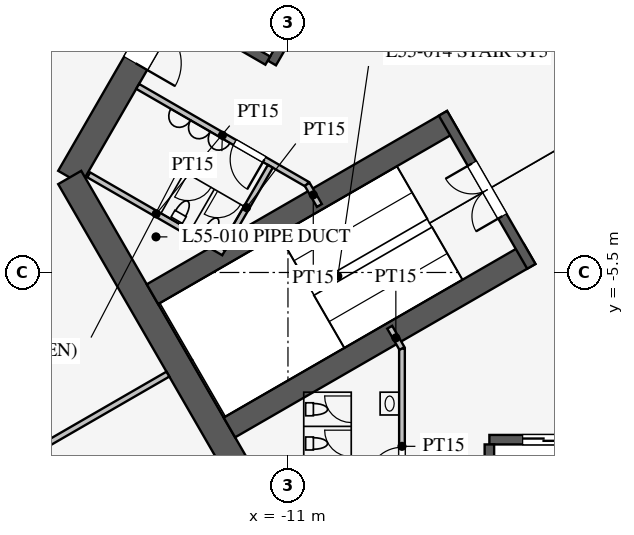
"""IFC4 building model, lengths in metres.
Left out: names, types, materials, properties, quantities, classifications, styles, units other than length and angle.
Written with IfcOpenShell. Run it as: python <this file> out.ifc"""

import sys

from ifc_helpers import new_model, si_unit, direction, frame, frame_2d, origin, place, context, subcontext, project, spatial, rectangle, extrude, element, fill, save


model = new_model("IFC4")
c1 = context("Model", 3, precision=1e-05, world=origin(), true_north=direction((0.0, 1.0)))
c2 = subcontext(c1, "Body", "Model", "MODEL_VIEW")
j1 = project(units=[si_unit("LENGTHUNIT", "METRE"), si_unit("PLANEANGLEUNIT", "RADIAN")], contexts=[c1])
p1 = place(None, origin())
s1 = spatial("IfcSite", under=j1, at=p1, CompositionType="ELEMENT")
p2 = place(p1, origin())
s2 = spatial("IfcBuilding", under=s1, at=p2, CompositionType="ELEMENT")
p3 = place(p2, frame((0.0, 0.0, 240.1)))
s3 = spatial("IfcBuildingStorey", under=s2, at=p3, CompositionType="ELEMENT", Elevation=240.1)
p4 = place(p3, frame((-5.773, 16.0, 0.0), z_axis=(0.0, 0.0, 1.0), x_axis=(-0.500002442456, -0.866023993627, 0.0)))
e1 = element("IfcWall", 1, at=p4, inside=s3, PredefinedType="SHEAR", context=c2, shape_type="SweptSolid", body=[
    extrude(rectangle(XDim=21.939, YDim=0.7, at=frame_2d((10.97, 0.0))), origin(), (0.0, 0.0, 1.0), 4.2),
])
p5 = place(p4, frame((17.27, 0.0, 0.0)))
e2 = element("IfcOpeningElement", 2, at=p5, cuts=e1, PredefinedType="OPENING", context=c2, shape_type="SweptSolid", body=[
    extrude(rectangle(XDim=1.2, YDim=2.1, at=frame_2d((0.6, 1.05))), frame((0.0, 0.36, 0.0), z_axis=(0.0, -1.0, 0.0), x_axis=(1.0, 0.0, 0.0)), (0.0, 0.0, 1.0), 0.72),
])
p6 = place(p4, frame((3.47, 0.0, 0.0)))
e3 = element("IfcOpeningElement", 3, at=p6, cuts=e1, PredefinedType="OPENING", context=c2, shape_type="SweptSolid", body=[
    extrude(rectangle(XDim=1.2, YDim=2.1, at=frame_2d((0.6, 1.05))), frame((0.0, 0.36, 0.0), z_axis=(0.0, -1.0, 0.0), x_axis=(1.0, 0.0, 0.0)), (0.0, 0.0, 1.0), 0.72),
])
p7 = place(p3, frame((-16.743, -3.0, 0.0), z_axis=(0.0, 0.0, 1.0), x_axis=(0.499995765644, -0.866027848477, 0.0)))
e4 = element("IfcWall", 4, at=p7, inside=s3, PredefinedType="SHEAR", context=c2, shape_type="SweptSolid", body=[
    extrude(rectangle(XDim=11.547, YDim=0.7, at=frame_2d((5.773, 0.0))), origin(), (0.0, 0.0, 1.0), 4.2),
])
p8 = place(p3, frame((-5.7, -9.9, 0.0), z_axis=(0.0, 0.0, 1.0), x_axis=(1.0, 0.0, 0.0)))
e5 = element("IfcWall", 5, at=p8, inside=s3, PredefinedType="SHEAR", context=c2, shape_type="SweptSolid", body=[
    extrude(rectangle(XDim=11.4, YDim=0.25, at=frame_2d((5.7, 0.0))), origin(), (0.0, 0.0, 1.0), 4.2),
])
p9 = place(p8, frame((0.875, 0.0, 0.0)))
e6 = element("IfcOpeningElement", 6, at=p9, cuts=e5, PredefinedType="OPENING", context=c2, shape_type="SweptSolid", body=[
    extrude(rectangle(XDim=1.1, YDim=2.2, at=frame_2d((0.55, 1.1))), frame((0.0, 0.135, 0.0), z_axis=(0.0, -1.0, 0.0), x_axis=(1.0, 0.0, 0.0)), (0.0, 0.0, 1.0), 0.27),
])
p10 = place(p8, frame((3.725, 0.0, 0.0)))
e7 = element("IfcOpeningElement", 7, at=p10, cuts=e5, PredefinedType="OPENING", context=c2, shape_type="SweptSolid", body=[
    extrude(rectangle(XDim=1.1, YDim=2.2, at=frame_2d((0.55, 1.1))), frame((0.0, 0.135, 0.0), z_axis=(0.0, -1.0, 0.0), x_axis=(1.0, 0.0, 0.0)), (0.0, 0.0, 1.0), 0.27),
])
p11 = place(p8, frame((6.575, 0.0, 0.0)))
e8 = element("IfcOpeningElement", 8, at=p11, cuts=e5, PredefinedType="OPENING", context=c2, shape_type="SweptSolid", body=[
    extrude(rectangle(XDim=1.1, YDim=2.2, at=frame_2d((0.55, 1.1))), frame((0.0, 0.135, 0.0), z_axis=(0.0, -1.0, 0.0), x_axis=(1.0, 0.0, 0.0)), (0.0, 0.0, 1.0), 0.27),
])
p12 = place(p8, frame((9.425, 0.0, 0.0)))
e9 = element("IfcOpeningElement", 9, at=p12, cuts=e5, PredefinedType="OPENING", context=c2, shape_type="SweptSolid", body=[
    extrude(rectangle(XDim=1.1, YDim=2.2, at=frame_2d((0.55, 1.1))), frame((0.0, 0.135, 0.0), z_axis=(0.0, -1.0, 0.0), x_axis=(1.0, 0.0, 0.0)), (0.0, 0.0, 1.0), 0.27),
])
p13 = place(p3, frame((-5.7, -10.025, 0.0), z_axis=(0.0, 0.0, 1.0), x_axis=(0.0, -1.0, 0.0)))
e10 = element("IfcWall", 10, at=p13, inside=s3, PredefinedType="SHEAR", context=c2, shape_type="SweptSolid", body=[
    extrude(rectangle(XDim=2.625, YDim=0.25, at=frame_2d((1.312, 0.0))), origin(), (0.0, 0.0, 1.0), 4.2),
])
p14 = place(p3, frame((-5.724, 9.886, 0.0), z_axis=(0.0, 0.0, 1.0), x_axis=(-0.500001763848, -0.866024385424, 0.0)))
e11 = element("IfcWall", 11, at=p14, inside=s3, PredefinedType="SHEAR", context=c2, shape_type="SweptSolid", body=[
    extrude(rectangle(XDim=11.4, YDim=0.25, at=frame_2d((5.7, 0.0))), origin(), (0.0, 0.0, 1.0), 4.2),
])
p15 = place(p14, frame((6.525, 0.0, 0.0)))
e12 = element("IfcOpeningElement", 12, at=p15, cuts=e11, PredefinedType="OPENING", context=c2, shape_type="SweptSolid", body=[
    extrude(rectangle(XDim=1.2, YDim=2.2, at=frame_2d((0.6, 1.1))), frame((0.0, 0.135, 0.0), z_axis=(0.0, -1.0, 0.0), x_axis=(1.0, 0.0, 0.0)), (0.0, 0.0, 1.0), 0.27),
])
p16 = place(p14, frame((9.375, 0.0, 0.0)))
e13 = element("IfcOpeningElement", 13, at=p16, cuts=e11, PredefinedType="OPENING", context=c2, shape_type="SweptSolid", body=[
    extrude(rectangle(XDim=1.2, YDim=2.2, at=frame_2d((0.6, 1.1))), frame((0.0, 0.135, 0.0), z_axis=(0.0, -1.0, 0.0), x_axis=(1.0, 0.0, 0.0)), (0.0, 0.0, 1.0), 0.27),
])
p17 = place(p3, frame((-11.532, 0.076, 0.0), z_axis=(0.0, 0.0, 1.0), x_axis=(-0.866013657776, 0.500020344131, 0.0)))
e14 = element("IfcWall", 14, at=p17, inside=s3, PredefinedType="SHEAR", context=c2, shape_type="SweptSolid", body=[
    extrude(rectangle(XDim=2.625, YDim=0.25, at=frame_2d((1.312, 0.0))), origin(), (0.0, 0.0, 1.0), 4.2),
])
for number, where, z_axis, x_axis in (
    (15, (-6.663, -1.509, 0.0), (0.0, 0.0, 1.0), (-0.866, -0.5, 0.0)),
    (16, (-4.638, -5.016, 0.0), (0.0, 0.0, 1.0), (-0.866, -0.5, 0.0)),
):
    element("IfcWall", number, at=place(p3, frame(where, z_axis=z_axis, x_axis=x_axis)), inside=s3, PredefinedType="SHEAR", context=c2, shape_type="SweptSolid", body=[
        extrude(rectangle(XDim=9.125, YDim=0.6, at=frame_2d((4.562, 0.0))), origin(), (0.0, 0.0, 1.0), 4.2),
    ])
p18 = place(p3, frame((-6.922, -1.312, 0.0), z_axis=(0.0, 0.0, 1.0), x_axis=(0.499984536904, -0.866034331223, 0.0)))
e17 = element("IfcWall", 17, at=p18, inside=s3, PredefinedType="SHEAR", context=c2, shape_type="SweptSolid", body=[
    extrude(rectangle(XDim=4.65, YDim=0.25, at=frame_2d((2.325, 0.0))), origin(), (0.0, 0.0, 1.0), 4.2),
])
p19 = place(p18, frame((1.525, 0.0, 0.0)))
e18 = element("IfcOpeningElement", 18, at=p19, cuts=e17, PredefinedType="OPENING", context=c2, shape_type="SweptSolid", body=[
    extrude(rectangle(XDim=1.6, YDim=2.1, at=frame_2d((0.8, 1.05))), frame((0.0, 0.135, 0.0), z_axis=(0.0, -1.0, 0.0), x_axis=(1.0, 0.0, 0.0)), (0.0, 0.0, 1.0), 0.27),
])
p20 = place(p3, frame((-8.0, -7.5, 0.0), z_axis=(0.0, 0.0, 1.0), x_axis=(0.0, -1.0, 0.0)))
e19 = element("IfcWall", 19, at=p20, inside=s3, PredefinedType="PARTITIONING", context=c2, shape_type="SweptSolid", body=[
    extrude(rectangle(XDim=5.15, YDim=0.15, at=frame_2d((2.575, 0.0))), origin(), (0.0, 0.0, 1.0), 4.0),
])
p21 = place(p20, frame((2.6, 0.0, 0.0)))
e20 = element("IfcOpeningElement", 20, at=p21, cuts=e19, PredefinedType="OPENING", context=c2, shape_type="SweptSolid", body=[
    extrude(rectangle(XDim=0.9, YDim=2.1, at=frame_2d((0.45, 1.05))), frame((0.0, 0.085, 0.0), z_axis=(0.0, -1.0, 0.0), x_axis=(1.0, 0.0, 0.0)), (0.0, 0.0, 1.0), 0.17),
])
p22 = place(p3, frame((-10.495, -3.178, 0.0), z_axis=(0.0, 0.0, 1.0), x_axis=(-0.866037967349, 0.499978238636, 0.0)))
e21 = element("IfcWall", 21, at=p22, inside=s3, PredefinedType="PARTITIONING", context=c2, shape_type="SweptSolid", body=[
    extrude(rectangle(XDim=5.15, YDim=0.15, at=frame_2d((2.575, 0.0))), origin(), (0.0, 0.0, 1.0), 4.0),
])
p23 = place(p22, frame((1.3, 0.0, 0.0)))
e22 = element("IfcOpeningElement", 22, at=p23, cuts=e21, PredefinedType="OPENING", context=c2, shape_type="SweptSolid", body=[
    extrude(rectangle(XDim=0.9, YDim=2.1, at=frame_2d((0.45, 1.05))), frame((0.0, 0.085, 0.0), z_axis=(0.0, -1.0, 0.0), x_axis=(1.0, 0.0, 0.0)), (0.0, 0.0, 1.0), 0.17),
])
for number, where, z_axis, x_axis in (
    (23, (-10.495, -3.178, 0.0), (0.0, 0.0, 1.0), (0.5, -0.866, 0.0)),
    (24, (-8.0, -7.5, 0.0), (0.0, 0.0, 1.0), (-0.5, 0.866, 0.0)),
):
    element("IfcWall", number, at=place(p3, frame(where, z_axis=z_axis, x_axis=x_axis)), inside=s3, PredefinedType="PARTITIONING", context=c2, shape_type="SweptSolid", body=[
        extrude(rectangle(XDim=0.645, YDim=0.15, at=frame_2d((0.323, 0.0))), origin(), (0.0, 0.0, 1.0), 4.0),
    ])
p24 = place(p3, frame((-12.691, -4.982, 0.0), z_axis=(0.0, 0.0, 1.0), x_axis=(-0.8660249478, 0.500000789788, 0.0)))
e25 = element("IfcWall", 25, at=p24, inside=s3, PredefinedType="PARTITIONING", context=c2, shape_type="SweptSolid", body=[
    extrude(rectangle(XDim=4.1, YDim=0.15, at=frame_2d((2.05, 0.0))), origin(), (0.0, 0.0, 1.0), 4.0),
])
p25 = place(p3, frame((-11.464, -2.706, 0.0), z_axis=(0.0, 0.0, 1.0), x_axis=(-0.50001992892, -0.866013897511, 0.0)))
e26 = element("IfcWall", 26, at=p25, inside=s3, PredefinedType="PARTITIONING", context=c2, shape_type="SweptSolid", body=[
    extrude(rectangle(XDim=2.51, YDim=0.15, at=frame_2d((1.255, 0.0))), origin(), (0.0, 0.0, 1.0), 4.0),
])
p26 = place(p3, frame((-14.159, -8.175, 0.0), z_axis=(0.0, 0.0, 1.0), x_axis=(-0.866027028085, -0.499997186618, 0.0)))
e27 = element("IfcWall", 27, at=p26, inside=s3, PredefinedType="PARTITIONING", context=c2, shape_type="SweptSolid", body=[
    extrude(rectangle(XDim=15.0, YDim=0.15, at=frame_2d((7.5, 0.0))), origin(), (0.0, 0.0, 1.0), 2.4),
])
p27 = place(p3, frame((-0.016, 30.392, 0.0), z_axis=(0.0, 0.0, 1.0), x_axis=(-0.500000626146, -0.866025042278, 0.0)))
e28 = element("IfcWall", 28, at=p27, inside=s3, PredefinedType="PARTITIONING", context=c2, shape_type="SweptSolid", body=[
    extrude(rectangle(XDim=52.624, YDim=0.12, at=frame_2d((26.312, 0.0))), origin(), (0.0, 0.0, 1.0), 2.9),
])
p28 = place(p27, frame((10.15, 0.0, 0.15)))
e29 = element("IfcOpeningElement", 29, at=p28, cuts=e28, PredefinedType="OPENING", context=c2, shape_type="SweptSolid", body=[
    extrude(rectangle(XDim=1.8, YDim=2.1, at=frame_2d((0.9, 1.05))), frame((0.0, 0.07, 0.0), z_axis=(0.0, -1.0, 0.0), x_axis=(1.0, 0.0, 0.0)), (0.0, 0.0, 1.0), 0.14),
])
p29 = place(p27, frame((40.65, 0.0, 0.15)))
e30 = element("IfcOpeningElement", 30, at=p29, cuts=e28, PredefinedType="OPENING", context=c2, shape_type="SweptSolid", body=[
    extrude(rectangle(XDim=1.8, YDim=2.1, at=frame_2d((0.9, 1.05))), frame((0.0, 0.07, 0.0), z_axis=(0.0, -1.0, 0.0), x_axis=(1.0, 0.0, 0.0)), (0.0, 0.0, 1.0), 0.14),
])
p30 = place(p21, frame((0.9, 0.0, 0.0), z_axis=(0.0, 0.0, 1.0), x_axis=(-1.0, 0.0, 0.0)))
e31 = element("IfcDoor", 31, at=p30, inside=s3, OperationType="SINGLE_SWING_LEFT", PredefinedType="DOOR", context=c2, shape_type="SweptSolid", body=[
    extrude(rectangle(XDim=0.9, YDim=2.1, at=frame_2d((0.45, 1.05))), frame((0.0, 0.025, 0.0), z_axis=(0.0, -1.0, 0.0), x_axis=(1.0, 0.0, 0.0)), (0.0, 0.0, 1.0), 0.05),
])
fill(e20, e31)
p31 = place(p23, origin())
e32 = element("IfcDoor", 32, at=p31, inside=s3, OperationType="SINGLE_SWING_LEFT", PredefinedType="DOOR", context=c2, shape_type="SweptSolid", body=[
    extrude(rectangle(XDim=0.9, YDim=2.1, at=frame_2d((0.45, 1.05))), frame((0.0, 0.025, 0.0), z_axis=(0.0, -1.0, 0.0), x_axis=(1.0, 0.0, 0.0)), (0.0, 0.0, 1.0), 0.05),
])
fill(e22, e32)
p32 = place(p19, frame((1.6, 0.0, 0.0), z_axis=(0.0, 0.0, 1.0), x_axis=(-1.0, 0.0, 0.0)))
e33 = element("IfcDoor", 33, at=p32, inside=s3, OperationType="DOUBLE_DOOR_SINGLE_SWING", PredefinedType="DOOR", context=c2, shape_type="SweptSolid", body=[
    extrude(rectangle(XDim=1.6, YDim=2.1, at=frame_2d((0.8, 1.05))), frame((0.0, 0.025, 0.0), z_axis=(0.0, -1.0, 0.0), x_axis=(1.0, 0.0, 0.0)), (0.0, 0.0, 1.0), 0.05),
])
fill(e18, e33)
p33 = place(p5, origin())
e34 = element("IfcDoor", 34, at=p33, inside=s3, OperationType="SINGLE_SWING_RIGHT", PredefinedType="DOOR", context=c2, shape_type="SweptSolid", body=[
    extrude(rectangle(XDim=1.2, YDim=2.1, at=frame_2d((0.6, 1.05))), frame((0.0, 0.025, 0.0), z_axis=(0.0, -1.0, 0.0), x_axis=(1.0, 0.0, 0.0)), (0.0, 0.0, 1.0), 0.05),
])
fill(e2, e34)
p34 = place(p9, origin())
e35 = element("IfcDoor", 35, at=p34, inside=s3, OperationType="DOUBLE_DOOR_SLIDING", PredefinedType="DOOR", context=c2, shape_type="SweptSolid", body=[
    extrude(rectangle(XDim=1.1, YDim=2.2, at=frame_2d((0.55, 1.1))), frame((0.0, 0.025, 0.0), z_axis=(0.0, -1.0, 0.0), x_axis=(1.0, 0.0, 0.0)), (0.0, 0.0, 1.0), 0.05),
])
fill(e6, e35)
save(model, sys.argv[1])
